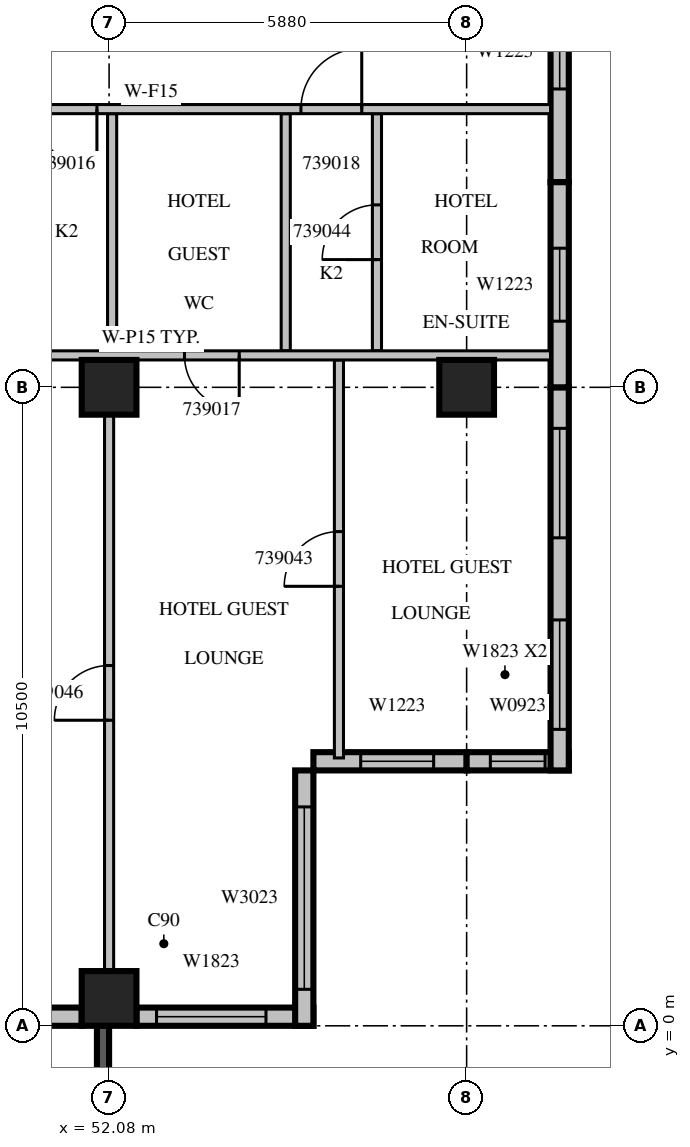
"""IFC4 building model, lengths in metres.
Left out: names, types, materials, properties, quantities, classifications, styles, units other than length and angle.
Written with IfcOpenShell. Run it as: python <this file> out.ifc"""

import sys

from ifc_helpers import new_model, si_unit, direction, frame, frame_2d, origin, origin_2d, place, context, subcontext, project, spatial, rectangle, extrude, source, transform, mapped, element, fill, save


model = new_model("IFC4")
c1 = context("Model", 3, precision=1e-05, world=origin(), true_north=direction((0.0, 1.0)))
c2 = subcontext(c1, "Body", "Model", "MODEL_VIEW")
j1 = project(units=[si_unit("LENGTHUNIT", "METRE"), si_unit("PLANEANGLEUNIT", "RADIAN")], contexts=[c1])
p1 = place(None, origin())
s1 = spatial("IfcSite", under=j1, at=p1, CompositionType="ELEMENT")
p2 = place(p1, origin())
s2 = spatial("IfcBuilding", under=s1, at=p2, CompositionType="ELEMENT")
p3 = place(p2, frame((0.0, 0.0, 181.6)))
s3 = spatial("IfcBuildingStorey", under=s2, at=p3, CompositionType="ELEMENT", Elevation=181.6)
m1 = source(origin(), c2, "Body", "SweptSolid", [
    extrude(rectangle(XDim=0.9, YDim=0.9, at=origin_2d()), origin(), (0.0, 0.0, 1.0), 3.8),
])
for number, where, z_axis, x_axis in (
    (1, (52.08, 0.45, 0.0), (0.0, 0.0, 1.0), (1.0, 0.0, 0.0)),
    (2, (52.08, 10.5, 0.0), (0.0, 0.0, 1.0), (1.0, 0.0, 0.0)),
    (3, (57.96, 10.5, 0.0), (0.0, 0.0, 1.0), (1.0, 0.0, 0.0)),
):
    element("IfcColumn", number, at=place(p3, frame(where, z_axis=z_axis, x_axis=x_axis)), inside=s3, PredefinedType="COLUMN", context=c2, shape_type="MappedRepresentation", body=[
        mapped(m1, transform((0.0, 0.0, 0.0), scale=1.0)),
    ])
m2 = source(origin(), c2, "Body", "SweptSolid", [
    extrude(rectangle(XDim=3.9, YDim=0.2, at=frame_2d((1.95, 0.0))), origin(), (0.0, 0.0, 1.0), 3.4),
])
p4 = place(p3, frame((51.98, 0.0, 0.0), z_axis=(0.0, 0.0, 1.0), x_axis=(0.0, -1.0, 0.0)))
e4 = element("IfcWall", 4, at=p4, inside=s3, PredefinedType="SOLIDWALL", context=c2, shape_type="MappedRepresentation", body=[
    mapped(m2, transform((0.0, 0.0, 0.0), scale=1.0)),
])
m3 = source(origin(), c2, "Body", "SweptSolid", [
    extrude(rectangle(XDim=2.4, YDim=2.3, at=frame_2d((1.2, 1.15))), frame((0.0, 0.11, 0.0), z_axis=(0.0, -1.0, 0.0), x_axis=(1.0, 0.0, 0.0)), (0.0, 0.0, 1.0), 0.22),
])
p5 = place(p4, frame((0.75, 0.0, 0.6)))
e5 = element("IfcOpeningElement", 5, at=p5, cuts=e4, PredefinedType="OPENING", context=c2, shape_type="MappedRepresentation", body=[
    mapped(m3, transform((0.0, 0.0, 0.0), scale=1.0)),
])
m4 = source(origin(), c2, "Body", "SweptSolid", [
    extrude(rectangle(XDim=4.98, YDim=0.3, at=frame_2d((2.49, 0.0))), origin(), (0.0, 0.0, 1.0), 3.4),
])
p6 = place(p3, frame((46.65, 0.15, 0.0), z_axis=(0.0, 0.0, 1.0), x_axis=(1.0, 0.0, 0.0)))
e6 = element("IfcWall", 6, at=p6, inside=s3, PredefinedType="STANDARD", context=c2, shape_type="MappedRepresentation", body=[
    mapped(m4, transform((0.0, 0.0, 0.0), scale=1.0)),
])
m5 = source(origin(), c2, "Body", "SweptSolid", [
    extrude(rectangle(XDim=1.0, YDim=2.1, at=frame_2d((0.5, 1.05))), frame((0.0, 0.16, 0.0), z_axis=(0.0, -1.0, 0.0), x_axis=(1.0, 0.0, 0.0)), (0.0, 0.0, 1.0), 0.32),
])
p7 = place(p6, frame((1.99, 0.0, 0.0)))
e7 = element("IfcOpeningElement", 7, at=p7, cuts=e6, PredefinedType="OPENING", context=c2, shape_type="MappedRepresentation", body=[
    mapped(m5, transform((0.0, 0.0, 0.0), scale=1.0)),
])
m6 = source(origin(), c2, "Body", "SweptSolid", [
    extrude(rectangle(XDim=2.91, YDim=0.3, at=frame_2d((1.455, 0.0))), origin(), (0.0, 0.0, 1.0), 3.4),
])
p8 = place(p3, frame((52.53, 0.15, 0.0), z_axis=(0.0, 0.0, 1.0), x_axis=(1.0, 0.0, 0.0)))
e8 = element("IfcWall", 8, at=p8, inside=s3, PredefinedType="STANDARD", context=c2, shape_type="MappedRepresentation", body=[
    mapped(m6, transform((0.0, 0.0, 0.0), scale=1.0)),
])
m7 = source(origin(), c2, "Body", "SweptSolid", [
    extrude(rectangle(XDim=1.8, YDim=2.3, at=frame_2d((0.9, 1.15))), frame((0.0, 0.16, 0.0), z_axis=(0.0, -1.0, 0.0), x_axis=(1.0, 0.0, 0.0)), (0.0, 0.0, 1.0), 0.32),
])
p9 = place(p8, frame((0.33, 0.0, 0.6)))
e9 = element("IfcOpeningElement", 9, at=p9, cuts=e8, PredefinedType="OPENING", context=c2, shape_type="MappedRepresentation", body=[
    mapped(m7, transform((0.0, 0.0, 0.0), scale=1.0)),
])
m8 = source(origin(), c2, "Body", "SweptSolid", [
    extrude(rectangle(XDim=4.2, YDim=0.3, at=frame_2d((2.1, 0.0))), origin(), (0.0, 0.0, 1.0), 3.4),
])
p10 = place(p3, frame((55.29, 0.0, 0.0), z_axis=(0.0, 0.0, 1.0), x_axis=(0.0, 1.0, 0.0)))
e10 = element("IfcWall", 10, at=p10, inside=s3, PredefinedType="STANDARD", context=c2, shape_type="MappedRepresentation", body=[
    mapped(m8, transform((0.0, 0.0, 0.0), scale=1.0)),
])
m9 = source(origin(), c2, "Body", "SweptSolid", [
    extrude(rectangle(XDim=3.0, YDim=2.3, at=frame_2d((1.5, 1.15))), frame((0.0, 0.16, 0.0), z_axis=(0.0, -1.0, 0.0), x_axis=(1.0, 0.0, 0.0)), (0.0, 0.0, 1.0), 0.32),
])
p11 = place(p10, frame((0.6, 0.0, 0.6)))
e11 = element("IfcOpeningElement", 11, at=p11, cuts=e10, PredefinedType="OPENING", context=c2, shape_type="MappedRepresentation", body=[
    mapped(m9, transform((0.0, 0.0, 0.0), scale=1.0)),
])
m10 = source(origin(), c2, "Body", "SweptSolid", [
    extrude(rectangle(XDim=2.52, YDim=0.3, at=frame_2d((1.26, 0.0))), origin(), (0.0, 0.0, 1.0), 3.4),
])
p12 = place(p3, frame((55.44, 4.35, 0.0), z_axis=(0.0, 0.0, 1.0), x_axis=(1.0, 0.0, 0.0)))
e12 = element("IfcWall", 12, at=p12, inside=s3, PredefinedType="STANDARD", context=c2, shape_type="MappedRepresentation", body=[
    mapped(m10, transform((0.0, 0.0, 0.0), scale=1.0)),
])
m11 = source(origin(), c2, "Body", "SweptSolid", [
    extrude(rectangle(XDim=1.2, YDim=2.3, at=frame_2d((0.6, 1.15))), frame((0.0, 0.16, 0.0), z_axis=(0.0, -1.0, 0.0), x_axis=(1.0, 0.0, 0.0)), (0.0, 0.0, 1.0), 0.32),
])
p13 = place(p12, frame((0.777, 0.0, 0.6)))
e13 = element("IfcOpeningElement", 13, at=p13, cuts=e12, PredefinedType="OPENING", context=c2, shape_type="MappedRepresentation", body=[
    mapped(m11, transform((0.0, 0.0, 0.0), scale=1.0)),
])
m12 = source(origin(), c2, "Body", "SweptSolid", [
    extrude(rectangle(XDim=1.68, YDim=0.3, at=frame_2d((0.84, 0.0))), origin(), (0.0, 0.0, 1.0), 3.4),
])
p14 = place(p3, frame((57.96, 4.35, 0.0), z_axis=(0.0, 0.0, 1.0), x_axis=(1.0, 0.0, 0.0)))
e14 = element("IfcWall", 14, at=p14, inside=s3, PredefinedType="STANDARD", context=c2, shape_type="MappedRepresentation", body=[
    mapped(m12, transform((0.0, 0.0, 0.0), scale=1.0)),
])
m13 = source(origin(), c2, "Body", "SweptSolid", [
    extrude(rectangle(XDim=0.9, YDim=2.3, at=frame_2d((0.45, 1.15))), frame((0.0, 0.16, 0.0), z_axis=(0.0, -1.0, 0.0), x_axis=(1.0, 0.0, 0.0)), (0.0, 0.0, 1.0), 0.32),
])
p15 = place(p14, frame((0.39, 0.0, 0.6)))
e15 = element("IfcOpeningElement", 15, at=p15, cuts=e14, PredefinedType="OPENING", context=c2, shape_type="MappedRepresentation", body=[
    mapped(m13, transform((0.0, 0.0, 0.0), scale=1.0)),
])
m14 = source(origin(), c2, "Body", "SweptSolid", [
    extrude(rectangle(XDim=6.3, YDim=0.3, at=frame_2d((3.15, 0.0))), origin(), (0.0, 0.0, 1.0), 3.4),
])
p16 = place(p3, frame((59.49, 4.2, 0.0), z_axis=(0.0, 0.0, 1.0), x_axis=(0.0, 1.0, 0.0)))
e16 = element("IfcWall", 16, at=p16, inside=s3, PredefinedType="STANDARD", context=c2, shape_type="MappedRepresentation", body=[
    mapped(m14, transform((0.0, 0.0, 0.0), scale=1.0)),
])
p17 = place(p16, frame((0.675, 0.0, 0.6)))
e17 = element("IfcOpeningElement", 17, at=p17, cuts=e16, PredefinedType="OPENING", context=c2, shape_type="MappedRepresentation", body=[
    mapped(m7, transform((0.0, 0.0, 0.0), scale=1.0)),
])
p18 = place(p16, frame((3.825, 0.0, 0.6)))
e18 = element("IfcOpeningElement", 18, at=p18, cuts=e16, PredefinedType="OPENING", context=c2, shape_type="MappedRepresentation", body=[
    mapped(m7, transform((0.0, 0.0, 0.0), scale=1.0)),
])
p19 = place(p3, frame((59.49, 10.5, 0.0), z_axis=(0.0, 0.0, 1.0), x_axis=(0.0, 1.0, 0.0)))
e19 = element("IfcWall", 19, at=p19, inside=s3, PredefinedType="STANDARD", context=c2, shape_type="SweptSolid", body=[
    extrude(rectangle(XDim=3.375, YDim=0.3, at=frame_2d((1.688, 0.0))), origin(), (0.0, 0.0, 1.0), 3.4),
])
p20 = place(p19, frame((1.087, 0.0, 0.6)))
e20 = element("IfcOpeningElement", 20, at=p20, cuts=e19, PredefinedType="OPENING", context=c2, shape_type="MappedRepresentation", body=[
    mapped(m11, transform((0.0, 0.0, 0.0), scale=1.0)),
])
m15 = source(origin(), c2, "Body", "SweptSolid", [
    extrude(rectangle(XDim=3.375, YDim=0.3, at=frame_2d((1.688, 0.0))), origin(), (0.0, 0.0, 1.0), 3.4),
])
p21 = place(p3, frame((59.49, 13.875, 0.0), z_axis=(0.0, 0.0, 1.0), x_axis=(0.0, 1.0, 0.0)))
e21 = element("IfcWall", 21, at=p21, inside=s3, PredefinedType="STANDARD", context=c2, shape_type="MappedRepresentation", body=[
    mapped(m15, transform((0.0, 0.0, 0.0), scale=1.0)),
])
p22 = place(p21, frame((1.531, 0.0, 0.6)))
e22 = element("IfcOpeningElement", 22, at=p22, cuts=e21, PredefinedType="OPENING", context=c2, shape_type="MappedRepresentation", body=[
    mapped(m11, transform((0.0, 0.0, 0.0), scale=1.0)),
])
m16 = source(origin(), c2, "Body", "SweptSolid", [
    extrude(rectangle(XDim=9.152, YDim=0.15, at=frame_2d((4.576, 0.0))), origin(), (0.0, 0.0, 1.0), 3.4),
])
p23 = place(p3, frame((52.08, 0.899, 0.0), z_axis=(0.0, 0.0, 1.0), x_axis=(0.0, 1.0, 0.0)))
e23 = element("IfcWall", 23, at=p23, inside=s3, PredefinedType="PARTITIONING", context=c2, shape_type="MappedRepresentation", body=[
    mapped(m16, transform((0.0, 0.0, 0.0), scale=1.0)),
])
m17 = source(origin(), c2, "Body", "SweptSolid", [
    extrude(rectangle(XDim=0.9, YDim=2.1, at=frame_2d((0.45, 1.05))), frame((0.0, 0.085, 0.0), z_axis=(0.0, -1.0, 0.0), x_axis=(1.0, 0.0, 0.0)), (0.0, 0.0, 1.0), 0.17),
])
p24 = place(p23, frame((4.126, 0.0, 0.0)))
e24 = element("IfcOpeningElement", 24, at=p24, cuts=e23, PredefinedType="OPENING", context=c2, shape_type="MappedRepresentation", body=[
    mapped(m17, transform((0.0, 0.0, 0.0), scale=1.0)),
])
m18 = source(origin(), c2, "Body", "SweptSolid", [
    extrude(rectangle(XDim=6.545, YDim=0.15, at=frame_2d((3.272, 0.0))), origin(), (0.0, 0.0, 1.0), 3.4),
])
p25 = place(p3, frame((55.86, 4.405, 0.0), z_axis=(0.0, 0.0, 1.0), x_axis=(0.0, 1.0, 0.0)))
e25 = element("IfcWall", 25, at=p25, inside=s3, PredefinedType="PARTITIONING", context=c2, shape_type="MappedRepresentation", body=[
    mapped(m18, transform((0.0, 0.0, 0.0), scale=1.0)),
])
p26 = place(p25, frame((2.822, 0.0, 0.0)))
e26 = element("IfcOpeningElement", 26, at=p26, cuts=e25, PredefinedType="OPENING", context=c2, shape_type="MappedRepresentation", body=[
    mapped(m17, transform((0.0, 0.0, 0.0), scale=1.0)),
])
m19 = source(origin(), c2, "Body", "SweptSolid", [
    extrude(rectangle(XDim=3.9, YDim=0.15, at=frame_2d((1.95, 0.0))), origin(), (0.0, 0.0, 1.0), 3.4),
])
for number, where, z_axis, x_axis in (
    (27, (52.13, 11.1, 0.0), (0.0, 0.0, 1.0), (0.0, 1.0, 0.0)),
    (28, (54.985, 11.1, 0.0), (0.0, 0.0, 1.0), (0.0, 1.0, 0.0)),
):
    element("IfcWall", number, at=place(p3, frame(where, z_axis=z_axis, x_axis=x_axis)), inside=s3, PredefinedType="PARTITIONING", context=c2, shape_type="MappedRepresentation", body=[
        mapped(m19, transform((0.0, 0.0, 0.0), scale=1.0)),
    ])
p27 = place(p3, frame((56.485, 11.1, 0.0), z_axis=(0.0, 0.0, 1.0), x_axis=(0.0, 1.0, 0.0)))
e29 = element("IfcWall", 29, at=p27, inside=s3, PredefinedType="PARTITIONING", context=c2, shape_type="MappedRepresentation", body=[
    mapped(m19, transform((0.0, 0.0, 0.0), scale=1.0)),
])
p28 = place(p27, frame((1.5, 0.0, 0.0)))
e30 = element("IfcOpeningElement", 30, at=p28, cuts=e29, PredefinedType="OPENING", context=c2, shape_type="MappedRepresentation", body=[
    mapped(m17, transform((0.0, 0.0, 0.0), scale=1.0)),
])
m20 = source(origin(), c2, "Body", "SweptSolid", [
    extrude(rectangle(XDim=13.14, YDim=0.15, at=frame_2d((6.57, 0.0))), origin(), (0.0, 0.0, 1.0), 3.4),
])
p29 = place(p3, frame((59.34, 11.025, 0.0), z_axis=(0.0, 0.0, 1.0), x_axis=(-1.0, 0.0, 0.0)))
e31 = element("IfcWall", 31, at=p29, inside=s3, PredefinedType="PARTITIONING", context=c2, shape_type="MappedRepresentation", body=[
    mapped(m20, transform((0.0, 0.0, 0.0), scale=1.0)),
])
p30 = place(p29, frame((11.765, 0.0, 0.0)))
e32 = element("IfcOpeningElement", 32, at=p30, cuts=e31, PredefinedType="OPENING", context=c2, shape_type="MappedRepresentation", body=[
    mapped(m17, transform((0.0, 0.0, 0.0), scale=1.0)),
])
p31 = place(p29, frame((9.637, 0.0, 0.0)))
e33 = element("IfcOpeningElement", 33, at=p31, cuts=e31, PredefinedType="OPENING", context=c2, shape_type="MappedRepresentation", body=[
    mapped(m17, transform((0.0, 0.0, 0.0), scale=1.0)),
])
p32 = place(p29, frame((5.12, 0.0, 0.0)))
e34 = element("IfcOpeningElement", 34, at=p32, cuts=e31, PredefinedType="OPENING", context=c2, shape_type="MappedRepresentation", body=[
    mapped(m17, transform((0.0, 0.0, 0.0), scale=1.0)),
])
p33 = place(p3, frame((59.34, 15.075, 0.0), z_axis=(0.0, 0.0, 1.0), x_axis=(-1.0, 0.0, 0.0)))
e35 = element("IfcWall", 35, at=p33, inside=s3, PredefinedType="PARTITIONING", context=c2, shape_type="MappedRepresentation", body=[
    mapped(m20, transform((0.0, 0.0, 0.0), scale=1.0)),
])
m21 = source(origin(), c2, "Body", "SweptSolid", [
    extrude(rectangle(XDim=1.0, YDim=2.1, at=frame_2d((0.5, 1.05))), frame((0.0, 0.085, 0.0), z_axis=(0.0, -1.0, 0.0), x_axis=(1.0, 0.0, 0.0)), (0.0, 0.0, 1.0), 0.17),
])
p34 = place(p33, frame((11.852, 0.0, 0.0)))
e36 = element("IfcOpeningElement", 36, at=p34, cuts=e35, PredefinedType="OPENING", context=c2, shape_type="MappedRepresentation", body=[
    mapped(m21, transform((0.0, 0.0, 0.0), scale=1.0)),
])
p35 = place(p33, frame((7.46, 0.0, 0.0)))
e37 = element("IfcOpeningElement", 37, at=p35, cuts=e35, PredefinedType="OPENING", context=c2, shape_type="MappedRepresentation", body=[
    mapped(m21, transform((0.0, 0.0, 0.0), scale=1.0)),
])
p36 = place(p33, frame((3.105, 0.0, 0.0)))
e38 = element("IfcOpeningElement", 38, at=p36, cuts=e35, PredefinedType="OPENING", context=c2, shape_type="MappedRepresentation", body=[
    mapped(m21, transform((0.0, 0.0, 0.0), scale=1.0)),
])
m22 = source(origin(), c2, "Body", "SweptSolid", [
    extrude(rectangle(XDim=1.8, YDim=2.3, at=frame_2d((0.9, 1.15))), frame((0.0, 0.03, 0.0), z_axis=(0.0, -1.0, 0.0), x_axis=(1.0, 0.0, 0.0)), (0.0, 0.0, 1.0), 0.06),
])
p37 = place(p9, origin())
e39 = element("IfcWindow", 39, at=p37, inside=s3, PartitioningType="SINGLE_PANEL", PredefinedType="WINDOW", context=c2, shape_type="MappedRepresentation", body=[
    mapped(m22, transform((0.0, 0.0, 0.0), scale=1.0)),
])
fill(e9, e39)
m23 = source(origin(), c2, "Body", "SweptSolid", [
    extrude(rectangle(XDim=3.0, YDim=2.3, at=frame_2d((1.5, 1.15))), frame((0.0, 0.03, 0.0), z_axis=(0.0, -1.0, 0.0), x_axis=(1.0, 0.0, 0.0)), (0.0, 0.0, 1.0), 0.06),
])
p38 = place(p11, origin())
e40 = element("IfcWindow", 40, at=p38, inside=s3, PartitioningType="SINGLE_PANEL", PredefinedType="WINDOW", context=c2, shape_type="MappedRepresentation", body=[
    mapped(m23, transform((0.0, 0.0, 0.0), scale=1.0)),
])
fill(e11, e40)
m24 = source(origin(), c2, "Body", "SweptSolid", [
    extrude(rectangle(XDim=1.2, YDim=2.3, at=frame_2d((0.6, 1.15))), frame((0.0, 0.03, 0.0), z_axis=(0.0, -1.0, 0.0), x_axis=(1.0, 0.0, 0.0)), (0.0, 0.0, 1.0), 0.06),
])
p39 = place(p13, origin())
e41 = element("IfcWindow", 41, at=p39, inside=s3, PartitioningType="SINGLE_PANEL", PredefinedType="WINDOW", context=c2, shape_type="MappedRepresentation", body=[
    mapped(m24, transform((0.0, 0.0, 0.0), scale=1.0)),
])
fill(e13, e41)
m25 = source(origin(), c2, "Body", "SweptSolid", [
    extrude(rectangle(XDim=0.9, YDim=2.3, at=frame_2d((0.45, 1.15))), frame((0.0, 0.03, 0.0), z_axis=(0.0, -1.0, 0.0), x_axis=(1.0, 0.0, 0.0)), (0.0, 0.0, 1.0), 0.06),
])
p40 = place(p15, origin())
e42 = element("IfcWindow", 42, at=p40, inside=s3, PartitioningType="SINGLE_PANEL", PredefinedType="WINDOW", context=c2, shape_type="MappedRepresentation", body=[
    mapped(m25, transform((0.0, 0.0, 0.0), scale=1.0)),
])
fill(e15, e42)
p41 = place(p17, origin())
e43 = element("IfcWindow", 43, at=p41, inside=s3, PartitioningType="SINGLE_PANEL", PredefinedType="WINDOW", context=c2, shape_type="MappedRepresentation", body=[
    mapped(m22, transform((0.0, 0.0, 0.0), scale=1.0)),
])
fill(e17, e43)
p42 = place(p18, origin())
e44 = element("IfcWindow", 44, at=p42, inside=s3, PartitioningType="SINGLE_PANEL", PredefinedType="WINDOW", context=c2, shape_type="MappedRepresentation", body=[
    mapped(m22, transform((0.0, 0.0, 0.0), scale=1.0)),
])
fill(e18, e44)
p43 = place(p20, origin())
e45 = element("IfcWindow", 45, at=p43, inside=s3, PartitioningType="SINGLE_PANEL", PredefinedType="WINDOW", context=c2, shape_type="MappedRepresentation", body=[
    mapped(m24, transform((0.0, 0.0, 0.0), scale=1.0)),
])
fill(e20, e45)
p44 = place(p22, origin())
e46 = element("IfcWindow", 46, at=p44, inside=s3, PartitioningType="SINGLE_PANEL", PredefinedType="WINDOW", context=c2, shape_type="MappedRepresentation", body=[
    mapped(m24, transform((0.0, 0.0, 0.0), scale=1.0)),
])
fill(e22, e46)
m26 = source(origin(), c2, "Body", "SweptSolid", [
    extrude(rectangle(XDim=1.0, YDim=2.1, at=frame_2d((0.5, 1.05))), frame((0.0, 0.025, 0.0), z_axis=(0.0, -1.0, 0.0), x_axis=(1.0, 0.0, 0.0)), (0.0, 0.0, 1.0), 0.05),
])
p45 = place(p35, origin())
e47 = element("IfcDoor", 47, at=p45, inside=s3, OperationType="SINGLE_SWING_LEFT", PredefinedType="DOOR", context=c2, shape_type="MappedRepresentation", body=[
    mapped(m26, transform((0.0, 0.0, 0.0), scale=1.0)),
])
fill(e37, e47)
m27 = source(origin(), c2, "Body", "SweptSolid", [
    extrude(rectangle(XDim=0.9, YDim=2.1, at=frame_2d((0.45, 1.05))), frame((0.0, 0.025, 0.0), z_axis=(0.0, -1.0, 0.0), x_axis=(1.0, 0.0, 0.0)), (0.0, 0.0, 1.0), 0.05),
])
p46 = place(p32, origin())
e48 = element("IfcDoor", 48, at=p46, inside=s3, OperationType="SINGLE_SWING_LEFT", PredefinedType="DOOR", context=c2, shape_type="MappedRepresentation", body=[
    mapped(m27, transform((0.0, 0.0, 0.0), scale=1.0)),
])
fill(e34, e48)
p47 = place(p36, origin())
e49 = element("IfcDoor", 49, at=p47, inside=s3, OperationType="SINGLE_SWING_RIGHT", PredefinedType="DOOR", context=c2, shape_type="MappedRepresentation", body=[
    mapped(m26, transform((0.0, 0.0, 0.0), scale=1.0)),
])
fill(e38, e49)
p48 = place(p26, origin())
e50 = element("IfcDoor", 50, at=p48, inside=s3, OperationType="SINGLE_SWING_LEFT", PredefinedType="DOOR", context=c2, shape_type="MappedRepresentation", body=[
    mapped(m27, transform((0.0, 0.0, 0.0), scale=1.0)),
])
fill(e26, e50)
p49 = place(p28, origin())
e51 = element("IfcDoor", 51, at=p49, inside=s3, OperationType="SINGLE_SWING_LEFT", PredefinedType="DOOR", context=c2, shape_type="MappedRepresentation", body=[
    mapped(m27, transform((0.0, 0.0, 0.0), scale=1.0)),
])
fill(e30, e51)
p50 = place(p24, origin())
e52 = element("IfcDoor", 52, at=p50, inside=s3, OperationType="SINGLE_SWING_LEFT", PredefinedType="DOOR", context=c2, shape_type="MappedRepresentation", body=[
    mapped(m27, transform((0.0, 0.0, 0.0), scale=1.0)),
])
fill(e24, e52)
save(model, sys.argv[1])
